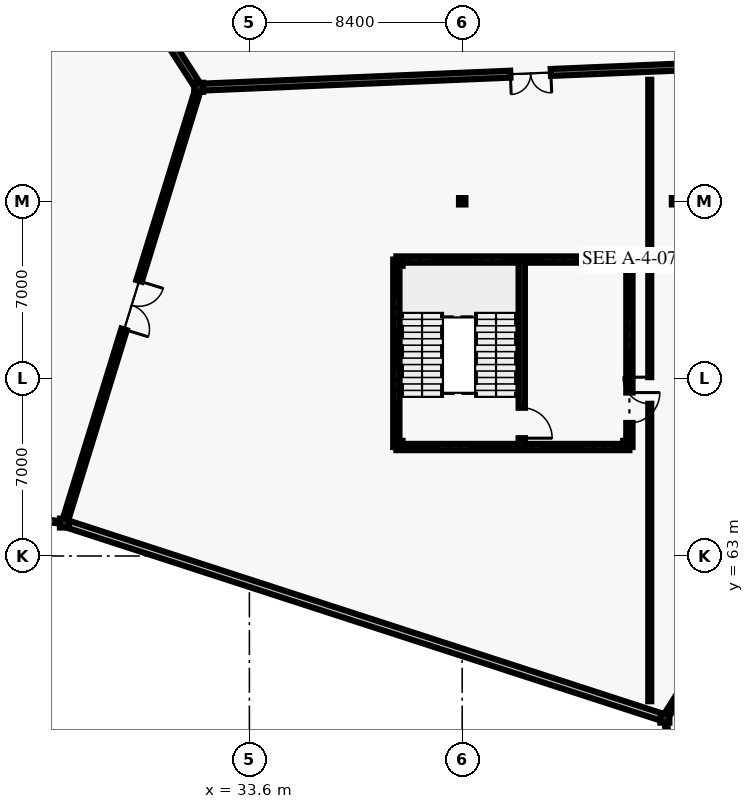
"""IFC4 building model, lengths in metres.
Left out: names, types, materials, properties, quantities, classifications, styles, units other than length and angle.
Written with IfcOpenShell. Run it as: python <this file> out.ifc"""

import sys

from ifc_helpers import new_model, si_unit, direction, frame, frame_2d, origin, origin_2d, place, context, subcontext, project, spatial, rectangle, hollow_circle, i_section, extrude, element, fill, save


model = new_model("IFC4")
c1 = context("Model", 3, precision=1e-05, world=origin(), true_north=direction((0.0, 1.0)))
c2 = subcontext(c1, "Body", "Model", "MODEL_VIEW")
j1 = project(units=[si_unit("LENGTHUNIT", "METRE"), si_unit("PLANEANGLEUNIT", "RADIAN")], contexts=[c1])
p1 = place(None, origin())
s1 = spatial("IfcSite", under=j1, at=p1, CompositionType="ELEMENT")
p2 = place(p1, origin())
s2 = spatial("IfcBuilding", under=s1, at=p2, CompositionType="ELEMENT")
p3 = place(p2, frame((0.0, 0.0, 10.2)))
s3 = spatial("IfcBuildingStorey", under=s2, at=p3, CompositionType="ELEMENT", Elevation=10.2)
for number, where, z_axis, x_axis in (
    (1, (26.3, 64.3, 0.0), (0.0, 0.0, 1.0), (1.0, 0.0, 0.0)),
    (2, (31.6, 81.5, 0.0), (0.0, 0.0, 1.0), (1.0, 0.0, 0.0)),
    (3, (50.0, 56.6, 0.0), (0.0, 0.0, 1.0), (1.0, 0.0, 0.0)),
):
    element("IfcColumn", number, at=place(p3, frame(where, z_axis=z_axis, x_axis=x_axis)), inside=s3, PredefinedType="COLUMN", context=c2, shape_type="SweptSolid", body=[
        extrude(hollow_circle(Radius=0.178, WallThickness=0.013, at=origin_2d()), origin(), (0.0, 0.0, 1.0), 4.8),
    ])
for number, where, z_axis, x_axis in (
    (4, (42.0, 77.0, 0.0), (0.0, 0.0, 1.0), (1.0, 0.0, 0.0)),
    (5, (50.4, 77.0, 0.0), (0.0, 0.0, 1.0), (1.0, 0.0, 0.0)),
    (6, (39.52, 67.42, 0.0), (0.0, 0.0, 1.0), (1.0, 0.0, 0.0)),
    (7, (48.48, 67.42, 0.0), (0.0, 0.0, 1.0), (1.0, 0.0, 0.0)),
    (8, (48.48, 74.58, 0.0), (0.0, 0.0, 1.0), (1.0, 0.0, 0.0)),
    (9, (39.52, 74.58, 0.0), (0.0, 0.0, 1.0), (1.0, 0.0, 0.0)),
):
    element("IfcColumn", number, at=place(p3, frame(where, z_axis=z_axis, x_axis=x_axis)), inside=s3, PredefinedType="COLUMN", context=c2, shape_type="SweptSolid", body=[
        extrude(i_section(OverallWidth=0.254, OverallDepth=0.254, WebThickness=0.009, FlangeThickness=0.014, FilletRadius=0.013, at=origin_2d()), origin(), (0.0, 0.0, 1.0), 4.8),
    ])
p4 = place(p3, frame((50.068, 56.196, 0.0), z_axis=(0.0, 0.0, 1.0), x_axis=(-0.165554954509, 0.986200566334, 0.0)))
e10 = element("IfcWall", 10, at=p4, inside=s3, PredefinedType="SOLIDWALL", context=c2, shape_type="SweptSolid", body=[
    extrude(rectangle(XDim=0.308, YDim=0.095, at=frame_2d((0.154, 0.0))), origin(), (0.0, 0.0, 1.0), 3.62),
])
p5 = place(p3, frame((49.943, 56.619, 0.0), z_axis=(0.0, 0.0, 1.0), x_axis=(-0.951074357174, 0.308962080402, 0.0)))
e11 = element("IfcWall", 11, at=p5, inside=s3, PredefinedType="SOLIDWALL", context=c2, shape_type="SweptSolid", body=[
    extrude(rectangle(XDim=24.8, YDim=0.29, at=frame_2d((12.4, 0.0))), origin(), (0.0, 0.0, 1.0), 3.62),
])
p6 = place(p3, frame((26.199, 64.314, 0.0), z_axis=(0.0, 0.0, 1.0), x_axis=(-0.991074779294, 0.133307096014, 0.0)))
e12 = element("IfcWall", 12, at=p6, inside=s3, PredefinedType="SOLIDWALL", context=c2, shape_type="SweptSolid", body=[
    extrude(rectangle(XDim=0.308, YDim=0.095, at=frame_2d((0.154, 0.0))), origin(), (0.0, 0.0, 1.0), 3.62),
])
p7 = place(p3, frame((60.5, 73.2, 0.0), z_axis=(0.0, 0.0, 1.0), x_axis=(-0.534570878454, -0.845123645338, 0.0)))
e13 = element("IfcWall", 13, at=p7, inside=s3, PredefinedType="SOLIDWALL", context=c2, shape_type="SweptSolid", body=[
    extrude(rectangle(XDim=19.642, YDim=0.225, at=frame_2d((9.821, 0.0))), origin(), (0.0, 0.0, 1.0), 4.02),
])
p8 = place(p7, frame((8.896, 0.0, 0.0)))
e14 = element("IfcOpeningElement", 14, at=p8, cuts=e13, PredefinedType="OPENING", context=c2, shape_type="SweptSolid", body=[
    extrude(rectangle(XDim=1.85, YDim=2.4, at=frame_2d((0.925, 1.2))), frame((0.0, 0.123, 0.0), z_axis=(0.0, -1.0, 0.0), x_axis=(1.0, 0.0, 0.0)), (0.0, 0.0, 1.0), 0.245),
])
p9 = place(p3, frame((57.8, 82.6, 0.0), z_axis=(0.0, 0.0, 1.0), x_axis=(-0.999119645224, -0.041951573605, 0.0)))
e15 = element("IfcWall", 15, at=p9, inside=s3, PredefinedType="SOLIDWALL", context=c2, shape_type="SweptSolid", body=[
    extrude(rectangle(XDim=26.223, YDim=0.275, at=frame_2d((13.112, 0.0))), origin(), (0.0, 0.0, 1.0), 4.02),
])
p10 = place(p9, frame((12.312, 0.0, 0.0)))
e16 = element("IfcOpeningElement", 16, at=p10, cuts=e15, PredefinedType="OPENING", context=c2, shape_type="SweptSolid", body=[
    extrude(rectangle(XDim=1.6, YDim=2.45, at=frame_2d((0.8, 1.225))), frame((0.0, 0.147, 0.0), z_axis=(0.0, -1.0, 0.0), x_axis=(1.0, 0.0, 0.0)), (0.0, 0.0, 1.0), 0.295),
])
p11 = place(p3, frame((31.6, 81.5, 0.0), z_axis=(0.0, 0.0, 1.0), x_axis=(-0.294479498062, -0.955657797133, 0.0)))
e17 = element("IfcWall", 17, at=p11, inside=s3, PredefinedType="SOLIDWALL", context=c2, shape_type="SweptSolid", body=[
    extrude(rectangle(XDim=17.998, YDim=0.225, at=frame_2d((8.999, 0.0))), origin(), (0.0, 0.0, 1.0), 4.02),
])
p12 = place(p11, frame((7.999, 0.0, 0.0)))
e18 = element("IfcOpeningElement", 18, at=p12, cuts=e17, PredefinedType="OPENING", context=c2, shape_type="SweptSolid", body=[
    extrude(rectangle(XDim=2.0, YDim=2.5, at=frame_2d((1.0, 1.25))), frame((0.0, 0.123, 0.0), z_axis=(0.0, -1.0, 0.0), x_axis=(1.0, 0.0, 0.0)), (0.0, 0.0, 1.0), 0.245),
])
p13 = place(p3, frame((27.4, 88.0, 0.0), z_axis=(0.0, 0.0, 1.0), x_axis=(0.542733189748, -0.839905164138, 0.0)))
e19 = element("IfcWall", 19, at=p13, inside=s3, PredefinedType="SOLIDWALL", context=c2, shape_type="SweptSolid", body=[
    extrude(rectangle(XDim=7.739, YDim=0.275, at=frame_2d((3.87, 0.0))), origin(), (0.0, 0.0, 1.0), 4.02),
])
p14 = place(p13, frame((3.069, 0.0, 0.0)))
e20 = element("IfcOpeningElement", 20, at=p14, cuts=e19, PredefinedType="OPENING", context=c2, shape_type="SweptSolid", body=[
    extrude(rectangle(XDim=1.6, YDim=2.45, at=frame_2d((0.8, 1.225))), frame((0.0, 0.147, 0.0), z_axis=(0.0, -1.0, 0.0), x_axis=(1.0, 0.0, 0.0)), (0.0, 0.0, 1.0), 0.295),
])
p15 = place(p3, frame((49.403, 57.267, 0.0), z_axis=(0.0, 0.0, 1.0), x_axis=(0.0, 1.0, 0.0)))
e21 = element("IfcWall", 21, at=p15, inside=s3, PredefinedType="PARTITIONING", context=c2, shape_type="SweptSolid", body=[
    extrude(rectangle(XDim=24.53, YDim=0.12, at=frame_2d((12.265, 0.0))), origin(), (0.0, 0.0, 1.0), 3.32),
])
p16 = place(p15, frame((11.74, 0.0, 0.0)))
e22 = element("IfcOpeningElement", 22, at=p16, cuts=e21, PredefinedType="OPENING", context=c2, shape_type="SweptSolid", body=[
    extrude(rectangle(XDim=1.05, YDim=2.2, at=frame_2d((0.525, 1.1))), frame((0.0, 0.07, 0.0), z_axis=(0.0, -1.0, 0.0), x_axis=(1.0, 0.0, 0.0)), (0.0, 0.0, 1.0), 0.14),
])
p17 = place(p3, frame((39.4, 67.3, 0.0), z_axis=(0.0, 0.0, 1.0), x_axis=(0.0, 1.0, 0.0)))
e23 = element("IfcWall", 23, at=p17, inside=s3, PredefinedType="SHEAR", context=c2, shape_type="SweptSolid", body=[
    extrude(rectangle(XDim=7.4, YDim=0.25, at=frame_2d((3.7, 0.0))), origin(), (0.0, 0.0, 1.0), 4.56),
])
for number, where, z_axis, x_axis in (
    (24, (39.4, 74.7, 0.0), (0.0, 0.0, 1.0), (1.0, 0.0, 0.0)),
    (25, (48.6, 67.3, 0.0), (0.0, 0.0, 1.0), (-1.0, 0.0, 0.0)),
):
    element("IfcWall", number, at=place(p3, frame(where, z_axis=z_axis, x_axis=x_axis)), inside=s3, PredefinedType="SHEAR", context=c2, shape_type="SweptSolid", body=[
        extrude(rectangle(XDim=9.2, YDim=0.25, at=frame_2d((4.6, 0.0))), origin(), (0.0, 0.0, 1.0), 4.56),
    ])
p18 = place(p3, frame((48.6, 74.7, 0.0), z_axis=(0.0, 0.0, 1.0), x_axis=(0.0, -1.0, 0.0)))
e26 = element("IfcWall", 26, at=p18, inside=s3, PredefinedType="SHEAR", context=c2, shape_type="SweptSolid", body=[
    extrude(rectangle(XDim=7.4, YDim=0.25, at=frame_2d((3.7, 0.0))), origin(), (0.0, 0.0, 1.0), 4.56),
])
p19 = place(p18, frame((5.25, 0.0, 0.0)))
e27 = element("IfcOpeningElement", 27, at=p19, cuts=e26, PredefinedType="OPENING", context=c2, shape_type="SweptSolid", body=[
    extrude(rectangle(XDim=1.2, YDim=2.2, at=frame_2d((0.6, 1.1))), frame((0.0, 0.135, 0.0), z_axis=(0.0, -1.0, 0.0), x_axis=(1.0, 0.0, 0.0)), (0.0, 0.0, 1.0), 0.27),
])
p20 = place(p3, frame((44.35, 74.7, 0.0), z_axis=(0.0, 0.0, 1.0), x_axis=(0.0, -1.0, 0.0)))
e28 = element("IfcWall", 28, at=p20, inside=s3, PredefinedType="SHEAR", context=c2, shape_type="SweptSolid", body=[
    extrude(rectangle(XDim=7.4, YDim=0.25, at=frame_2d((3.7, 0.0))), origin(), (0.0, 0.0, 1.0), 4.56),
])
p21 = place(p20, frame((5.85, 0.0, 0.0)))
e29 = element("IfcOpeningElement", 29, at=p21, cuts=e28, PredefinedType="OPENING", context=c2, shape_type="SweptSolid", body=[
    extrude(rectangle(XDim=1.2, YDim=2.2, at=frame_2d((0.6, 1.1))), frame((0.0, 0.135, 0.0), z_axis=(0.0, -1.0, 0.0), x_axis=(1.0, 0.0, 0.0)), (0.0, 0.0, 1.0), 0.27),
])
p22 = place(p10, origin())
e30 = element("IfcDoor", 30, at=p22, inside=s3, OperationType="DOUBLE_DOOR_SINGLE_SWING", PredefinedType="DOOR", context=c2, shape_type="SweptSolid", body=[
    extrude(rectangle(XDim=1.6, YDim=2.45, at=frame_2d((0.8, 1.225))), frame((0.0, 0.025, 0.0), z_axis=(0.0, -1.0, 0.0), x_axis=(1.0, 0.0, 0.0)), (0.0, 0.0, 1.0), 0.05),
])
fill(e16, e30)
p23 = place(p12, origin())
e31 = element("IfcDoor", 31, at=p23, inside=s3, OperationType="DOUBLE_DOOR_SINGLE_SWING", PredefinedType="DOOR", context=c2, shape_type="SweptSolid", body=[
    extrude(rectangle(XDim=2.0, YDim=2.5, at=frame_2d((1.0, 1.25))), frame((0.0, 0.025, 0.0), z_axis=(0.0, -1.0, 0.0), x_axis=(1.0, 0.0, 0.0)), (0.0, 0.0, 1.0), 0.05),
])
fill(e18, e31)
p24 = place(p16, origin())
e32 = element("IfcDoor", 32, at=p24, inside=s3, OperationType="SINGLE_SWING_RIGHT", PredefinedType="DOOR", context=c2, shape_type="SweptSolid", body=[
    extrude(rectangle(XDim=1.05, YDim=2.2, at=frame_2d((0.525, 1.1))), frame((0.0, 0.025, 0.0), z_axis=(0.0, -1.0, 0.0), x_axis=(1.0, 0.0, 0.0)), (0.0, 0.0, 1.0), 0.05),
])
fill(e22, e32)
p25 = place(p19, origin())
e33 = element("IfcDoor", 33, at=p25, inside=s3, OperationType="SINGLE_SWING_LEFT", PredefinedType="DOOR", context=c2, shape_type="SweptSolid", body=[
    extrude(rectangle(XDim=1.2, YDim=2.2, at=frame_2d((0.6, 1.1))), frame((0.0, 0.025, 0.0), z_axis=(0.0, -1.0, 0.0), x_axis=(1.0, 0.0, 0.0)), (0.0, 0.0, 1.0), 0.05),
])
fill(e27, e33)
p26 = place(p21, origin())
e34 = element("IfcDoor", 34, at=p26, inside=s3, OperationType="SINGLE_SWING_RIGHT", PredefinedType="DOOR", context=c2, shape_type="SweptSolid", body=[
    extrude(rectangle(XDim=1.2, YDim=2.2, at=frame_2d((0.6, 1.1))), frame((0.0, 0.025, 0.0), z_axis=(0.0, -1.0, 0.0), x_axis=(1.0, 0.0, 0.0)), (0.0, 0.0, 1.0), 0.05),
])
fill(e29, e34)
save(model, sys.argv[1])
